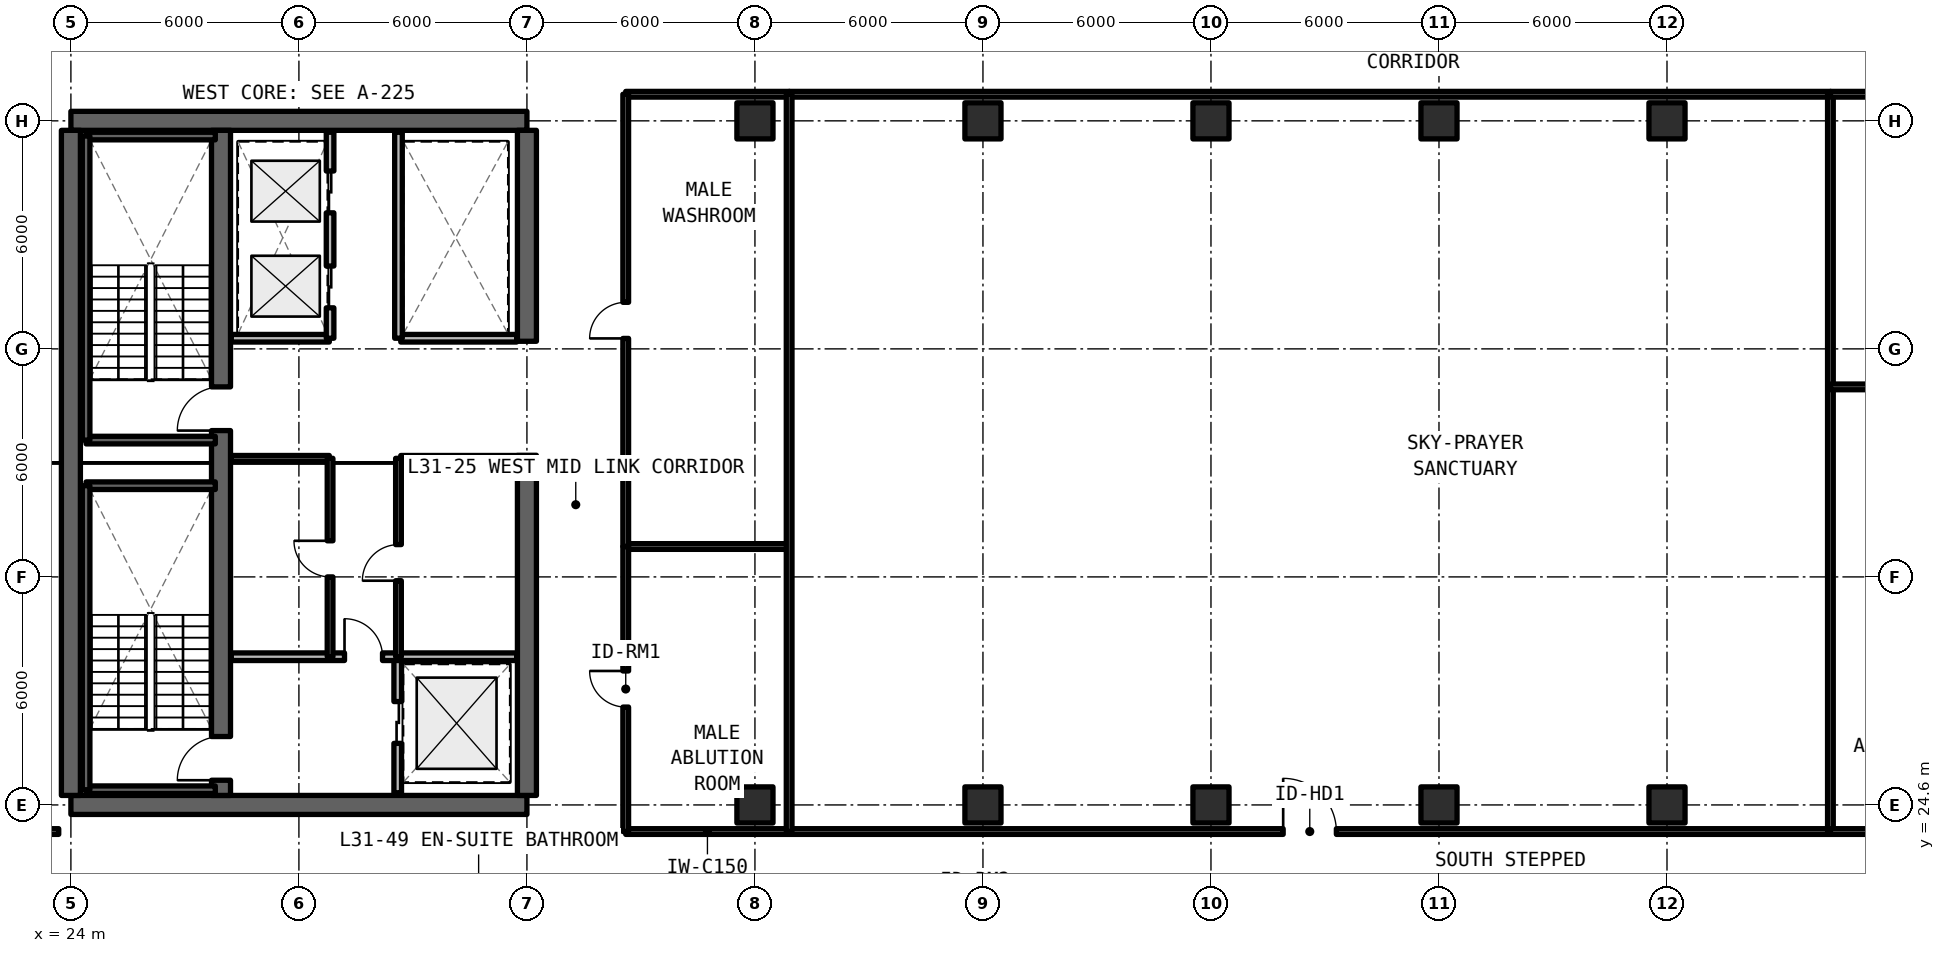
"""IFC4 building model, lengths in metres.
Left out: names, types, materials, properties, quantities, classifications, styles, units other than length and angle.
Written with IfcOpenShell. Run it as: python <this file> out.ifc"""

import sys

from ifc_helpers import new_model, si_unit, direction, frame, frame_2d, origin, origin_2d, place, context, subcontext, project, spatial, rectangle, extrude, element, fill, save


model = new_model("IFC4")
c1 = context("Model", 3, precision=1e-05, world=origin(), true_north=direction((0.0, 1.0)))
c2 = subcontext(c1, "Body", "Model", "MODEL_VIEW")
j1 = project(units=[si_unit("LENGTHUNIT", "METRE"), si_unit("PLANEANGLEUNIT", "RADIAN")], contexts=[c1])
p1 = place(None, origin())
s1 = spatial("IfcSite", under=j1, at=p1, CompositionType="ELEMENT")
p2 = place(p1, origin())
s2 = spatial("IfcBuilding", under=s1, at=p2, CompositionType="ELEMENT")
p3 = place(p2, frame((0.0, 0.0, 112.2)))
s3 = spatial("IfcBuildingStorey", under=s2, at=p3, CompositionType="ELEMENT", Elevation=112.2)
for number, where, z_axis, x_axis in (
    (1, (24.0, 24.6, 0.0), (0.0, 0.0, 1.0), (1.0, 0.0, 0.0)),
    (2, (36.0, 42.6, 0.0), (0.0, 0.0, 1.0), (-1.0, 0.0, 0.0)),
):
    element("IfcWall", number, at=place(p3, frame(where, z_axis=z_axis, x_axis=x_axis)), inside=s3, PredefinedType="SHEAR", context=c2, shape_type="SweptSolid", body=[
        extrude(rectangle(XDim=12.0, YDim=0.5, at=frame_2d((6.0, 0.0))), origin(), (0.0, 0.0, 1.0), 3.63),
    ])
p4 = place(p3, frame((24.0, 24.85, 0.0), z_axis=(0.0, 0.0, 1.0), x_axis=(0.0, 1.0, 0.0)))
e3 = element("IfcWall", 3, at=p4, inside=s3, PredefinedType="SHEAR", context=c2, shape_type="SweptSolid", body=[
    extrude(rectangle(XDim=17.5, YDim=0.5, at=frame_2d((8.75, 0.0))), origin(), (0.0, 0.0, 1.0), 3.63),
])
p5 = place(p3, frame((36.0, 24.85, 0.0), z_axis=(0.0, 0.0, 1.0), x_axis=(0.0, 1.0, 0.0)))
e4 = element("IfcWall", 4, at=p5, inside=s3, PredefinedType="SHEAR", context=c2, shape_type="SweptSolid", body=[
    extrude(rectangle(XDim=8.95, YDim=0.5, at=frame_2d((4.475, 0.0))), origin(), (0.0, 0.0, 1.0), 3.63),
])
p6 = place(p3, frame((36.0, 36.8, 0.0), z_axis=(0.0, 0.0, 1.0), x_axis=(0.0, 1.0, 0.0)))
e5 = element("IfcWall", 5, at=p6, inside=s3, PredefinedType="SHEAR", context=c2, shape_type="SweptSolid", body=[
    extrude(rectangle(XDim=5.55, YDim=0.5, at=frame_2d((2.775, 0.0))), origin(), (0.0, 0.0, 1.0), 3.63),
])
p7 = place(p3, frame((27.95, 24.85, 0.0), z_axis=(0.0, 0.0, 1.0), x_axis=(0.0, 1.0, 0.0)))
e6 = element("IfcWall", 6, at=p7, inside=s3, PredefinedType="SHEAR", context=c2, shape_type="SweptSolid", body=[
    extrude(rectangle(XDim=17.5, YDim=0.5, at=frame_2d((8.75, 0.0))), origin(), (0.0, 0.0, 1.0), 3.63),
])
p8 = place(p7, frame((0.4, 0.0, 0.0)))
e7 = element("IfcOpeningElement", 7, at=p8, cuts=e6, PredefinedType="OPENING", context=c2, shape_type="SweptSolid", body=[
    extrude(rectangle(XDim=1.15, YDim=2.15, at=frame_2d((0.575, 1.075))), frame((0.0, 0.26, 0.0), z_axis=(0.0, -1.0, 0.0), x_axis=(1.0, 0.0, 0.0)), (0.0, 0.0, 1.0), 0.52),
])
p9 = place(p7, frame((9.6, 0.0, 0.0)))
e8 = element("IfcOpeningElement", 8, at=p9, cuts=e6, PredefinedType="OPENING", context=c2, shape_type="SweptSolid", body=[
    extrude(rectangle(XDim=1.15, YDim=2.15, at=frame_2d((0.575, 1.075))), frame((0.0, 0.26, 0.0), z_axis=(0.0, -1.0, 0.0), x_axis=(1.0, 0.0, 0.0)), (0.0, 0.0, 1.0), 0.52),
])
for number, where, z_axis, x_axis in (
    (9, (42.0, 24.6, 0.0), (0.0, 0.0, 1.0), (1.0, 0.0, 0.0)),
    (10, (42.0, 42.6, 0.0), (0.0, 0.0, 1.0), (1.0, 0.0, 0.0)),
    (11, (48.0, 24.6, 0.0), (0.0, 0.0, 1.0), (1.0, 0.0, 0.0)),
    (12, (48.0, 42.6, 0.0), (0.0, 0.0, 1.0), (1.0, 0.0, 0.0)),
    (13, (54.0, 24.6, 0.0), (0.0, 0.0, 1.0), (1.0, 0.0, 0.0)),
    (14, (54.0, 42.6, 0.0), (0.0, 0.0, 1.0), (1.0, 0.0, 0.0)),
    (15, (60.0, 24.6, 0.0), (0.0, 0.0, 1.0), (1.0, 0.0, 0.0)),
    (16, (60.0, 42.6, 0.0), (0.0, 0.0, 1.0), (1.0, 0.0, 0.0)),
    (17, (66.0, 24.6, 0.0), (0.0, 0.0, 1.0), (1.0, 0.0, 0.0)),
    (18, (66.0, 42.6, 0.0), (0.0, 0.0, 1.0), (1.0, 0.0, 0.0)),
):
    element("IfcColumn", number, at=place(p3, frame(where, z_axis=z_axis, x_axis=x_axis)), inside=s3, PredefinedType="COLUMN", context=c2, shape_type="SweptSolid", body=[
        extrude(rectangle(XDim=0.95, YDim=0.95, at=origin_2d()), origin(), (0.0, 0.0, 1.0), 3.63),
    ])
p10 = place(p3, frame((32.6, 24.92, 0.0), z_axis=(0.0, 0.0, 1.0), x_axis=(0.0, 1.0, 0.0)))
e19 = element("IfcWall", 19, at=p10, inside=s3, PredefinedType="SOLIDWALL", context=c2, shape_type="SweptSolid", body=[
    extrude(rectangle(XDim=3.58, YDim=0.2, at=frame_2d((1.79, 0.0))), origin(), (0.0, 0.0, 1.0), 2.63),
])
p11 = place(p10, frame((1.3, 0.0, 0.0)))
e20 = element("IfcOpeningElement", 20, at=p11, cuts=e19, PredefinedType="OPENING", context=c2, shape_type="SweptSolid", body=[
    extrude(rectangle(XDim=1.1, YDim=2.2, at=frame_2d((0.55, 1.1))), frame((0.0, 0.11, 0.0), z_axis=(0.0, -1.0, 0.0), x_axis=(1.0, 0.0, 0.0)), (0.0, 0.0, 1.0), 0.22),
])
p12 = place(p3, frame((28.22, 28.5, 0.0), z_axis=(0.0, 0.0, 1.0), x_axis=(1.0, 0.0, 0.0)))
e21 = element("IfcWall", 21, at=p12, inside=s3, PredefinedType="SOLIDWALL", context=c2, shape_type="SweptSolid", body=[
    extrude(rectangle(XDim=7.51, YDim=0.2, at=frame_2d((3.755, 0.0))), origin(), (0.0, 0.0, 1.0), 2.63),
])
p13 = place(p12, frame((2.98, 0.0, 0.0)))
e22 = element("IfcOpeningElement", 22, at=p13, cuts=e21, PredefinedType="OPENING", context=c2, shape_type="SweptSolid", body=[
    extrude(rectangle(XDim=1.0, YDim=2.15, at=frame_2d((0.5, 1.075))), frame((0.0, 0.11, 0.0), z_axis=(0.0, -1.0, 0.0), x_axis=(1.0, 0.0, 0.0)), (0.0, 0.0, 1.0), 0.22),
])
p14 = place(p3, frame((28.22, 33.72, 0.0), z_axis=(0.0, 0.0, 1.0), x_axis=(1.0, 0.0, 0.0)))
e23 = element("IfcWall", 23, at=p14, inside=s3, PredefinedType="SOLIDWALL", context=c2, shape_type="SweptSolid", body=[
    extrude(rectangle(XDim=2.58, YDim=0.15, at=frame_2d((1.29, 0.0))), origin(), (0.0, 0.0, 1.0), 2.63),
])
p15 = place(p3, frame((30.82, 28.5, 0.0), z_axis=(0.0, 0.0, 1.0), x_axis=(0.0, 1.0, 0.0)))
e24 = element("IfcWall", 24, at=p15, inside=s3, PredefinedType="SOLIDWALL", context=c2, shape_type="SweptSolid", body=[
    extrude(rectangle(XDim=5.22, YDim=0.15, at=frame_2d((2.61, 0.0))), origin(), (0.0, 0.0, 1.0), 2.63),
])
p16 = place(p15, frame((2.1, 0.0, 0.0)))
e25 = element("IfcOpeningElement", 25, at=p16, cuts=e24, PredefinedType="OPENING", context=c2, shape_type="SweptSolid", body=[
    extrude(rectangle(XDim=0.95, YDim=2.15, at=frame_2d((0.475, 1.075))), frame((0.0, 0.085, 0.0), z_axis=(0.0, -1.0, 0.0), x_axis=(1.0, 0.0, 0.0)), (0.0, 0.0, 1.0), 0.17),
])
p17 = place(p3, frame((32.68, 33.72, 0.0), z_axis=(0.0, 0.0, 1.0), x_axis=(1.0, 0.0, 0.0)))
e26 = element("IfcWall", 26, at=p17, inside=s3, PredefinedType="SOLIDWALL", context=c2, shape_type="SweptSolid", body=[
    extrude(rectangle(XDim=3.05, YDim=0.15, at=frame_2d((1.525, 0.0))), origin(), (0.0, 0.0, 1.0), 2.63),
])
p18 = place(p3, frame((32.62, 28.5, 0.0), z_axis=(0.0, 0.0, 1.0), x_axis=(0.0, 1.0, 0.0)))
e27 = element("IfcWall", 27, at=p18, inside=s3, PredefinedType="SOLIDWALL", context=c2, shape_type="SweptSolid", body=[
    extrude(rectangle(XDim=5.22, YDim=0.15, at=frame_2d((2.61, 0.0))), origin(), (0.0, 0.0, 1.0), 2.63),
])
p19 = place(p18, frame((2.0, 0.0, 0.0)))
e28 = element("IfcOpeningElement", 28, at=p19, cuts=e27, PredefinedType="OPENING", context=c2, shape_type="SweptSolid", body=[
    extrude(rectangle(XDim=0.95, YDim=2.15, at=frame_2d((0.475, 1.075))), frame((0.0, 0.085, 0.0), z_axis=(0.0, -1.0, 0.0), x_axis=(1.0, 0.0, 0.0)), (0.0, 0.0, 1.0), 0.17),
])
p20 = place(p3, frame((28.22, 36.88, 0.0), z_axis=(0.0, 0.0, 1.0), x_axis=(1.0, 0.0, 0.0)))
e29 = element("IfcWall", 29, at=p20, inside=s3, PredefinedType="SOLIDWALL", context=c2, shape_type="SweptSolid", body=[
    extrude(rectangle(XDim=2.58, YDim=0.2, at=frame_2d((1.29, 0.0))), origin(), (0.0, 0.0, 1.0), 2.63),
])
p21 = place(p3, frame((30.82, 36.88, 0.0), z_axis=(0.0, 0.0, 1.0), x_axis=(0.0, 1.0, 0.0)))
e30 = element("IfcWall", 30, at=p21, inside=s3, PredefinedType="SOLIDWALL", context=c2, shape_type="SweptSolid", body=[
    extrude(rectangle(XDim=5.42, YDim=0.2, at=frame_2d((2.71, 0.0))), origin(), (0.0, 0.0, 1.0), 2.63),
])
p22 = place(p21, frame((0.8, 0.0, 0.0)))
e31 = element("IfcOpeningElement", 31, at=p22, cuts=e30, PredefinedType="OPENING", context=c2, shape_type="SweptSolid", body=[
    extrude(rectangle(XDim=1.1, YDim=2.2, at=frame_2d((0.55, 1.1))), frame((0.0, 0.11, 0.0), z_axis=(0.0, -1.0, 0.0), x_axis=(1.0, 0.0, 0.0)), (0.0, 0.0, 1.0), 0.22),
])
p23 = place(p21, frame((3.3, 0.0, 0.0)))
e32 = element("IfcOpeningElement", 32, at=p23, cuts=e30, PredefinedType="OPENING", context=c2, shape_type="SweptSolid", body=[
    extrude(rectangle(XDim=1.1, YDim=2.2, at=frame_2d((0.55, 1.1))), frame((0.0, 0.11, 0.0), z_axis=(0.0, -1.0, 0.0), x_axis=(1.0, 0.0, 0.0)), (0.0, 0.0, 1.0), 0.22),
])
p24 = place(p3, frame((32.68, 36.88, 0.0), z_axis=(0.0, 0.0, 1.0), x_axis=(1.0, 0.0, 0.0)))
e33 = element("IfcWall", 33, at=p24, inside=s3, PredefinedType="SOLIDWALL", context=c2, shape_type="SweptSolid", body=[
    extrude(rectangle(XDim=3.05, YDim=0.2, at=frame_2d((1.525, 0.0))), origin(), (0.0, 0.0, 1.0), 2.63),
])
p25 = place(p3, frame((32.62, 36.88, 0.0), z_axis=(0.0, 0.0, 1.0), x_axis=(0.0, 1.0, 0.0)))
e34 = element("IfcWall", 34, at=p25, inside=s3, PredefinedType="SOLIDWALL", context=c2, shape_type="SweptSolid", body=[
    extrude(rectangle(XDim=5.42, YDim=0.2, at=frame_2d((2.71, 0.0))), origin(), (0.0, 0.0, 1.0), 2.63),
])
for number, where, z_axis, x_axis in (
    (35, (38.6, 23.9, 0.0), (0.0, 0.0, 1.0), (1.0, 0.0, 0.0)),
    (36, (38.6, 31.4, 0.0), (0.0, 0.0, 1.0), (1.0, 0.0, 0.0)),
):
    element("IfcWall", number, at=place(p3, frame(where, z_axis=z_axis, x_axis=x_axis)), inside=s3, PredefinedType="SOLIDWALL", context=c2, shape_type="SweptSolid", body=[
        extrude(rectangle(XDim=4.3, YDim=0.15, at=frame_2d((2.15, 0.0))), origin(), (0.0, 0.0, 1.0), 2.63),
    ])
p26 = place(p3, frame((38.6, 23.9, 0.0), z_axis=(0.0, 0.0, 1.0), x_axis=(0.0, 1.0, 0.0)))
e37 = element("IfcWall", 37, at=p26, inside=s3, PredefinedType="SOLIDWALL", context=c2, shape_type="SweptSolid", body=[
    extrude(rectangle(XDim=7.5, YDim=0.15, at=frame_2d((3.75, 0.0))), origin(), (0.0, 0.0, 1.0), 2.63),
])
p27 = place(p26, frame((3.275, 0.0, 0.0)))
e38 = element("IfcOpeningElement", 38, at=p27, cuts=e37, PredefinedType="OPENING", context=c2, shape_type="SweptSolid", body=[
    extrude(rectangle(XDim=0.95, YDim=2.15, at=frame_2d((0.475, 1.075))), frame((0.0, 0.085, 0.0), z_axis=(0.0, -1.0, 0.0), x_axis=(1.0, 0.0, 0.0)), (0.0, 0.0, 1.0), 0.17),
])
p28 = place(p3, frame((38.6, 43.3, 0.0), z_axis=(0.0, 0.0, 1.0), x_axis=(1.0, 0.0, 0.0)))
e39 = element("IfcWall", 39, at=p28, inside=s3, PredefinedType="SOLIDWALL", context=c2, shape_type="SweptSolid", body=[
    extrude(rectangle(XDim=4.3, YDim=0.15, at=frame_2d((2.15, 0.0))), origin(), (0.0, 0.0, 1.0), 2.63),
])
p29 = place(p3, frame((38.6, 31.4, 0.0), z_axis=(0.0, 0.0, 1.0), x_axis=(0.0, 1.0, 0.0)))
e40 = element("IfcWall", 40, at=p29, inside=s3, PredefinedType="SOLIDWALL", context=c2, shape_type="SweptSolid", body=[
    extrude(rectangle(XDim=11.9, YDim=0.15, at=frame_2d((5.95, 0.0))), origin(), (0.0, 0.0, 1.0), 2.63),
])
p30 = place(p29, frame((5.475, 0.0, 0.0)))
e41 = element("IfcOpeningElement", 41, at=p30, cuts=e40, PredefinedType="OPENING", context=c2, shape_type="SweptSolid", body=[
    extrude(rectangle(XDim=0.95, YDim=2.15, at=frame_2d((0.475, 1.075))), frame((0.0, 0.085, 0.0), z_axis=(0.0, -1.0, 0.0), x_axis=(1.0, 0.0, 0.0)), (0.0, 0.0, 1.0), 0.17),
])
p31 = place(p3, frame((42.9, 23.9, 0.0), z_axis=(0.0, 0.0, 1.0), x_axis=(1.0, 0.0, 0.0)))
e42 = element("IfcWall", 42, at=p31, inside=s3, PredefinedType="SOLIDWALL", context=c2, shape_type="SweptSolid", body=[
    extrude(rectangle(XDim=27.4, YDim=0.15, at=frame_2d((13.7, 0.0))), origin(), (0.0, 0.0, 1.0), 2.63),
])
p32 = place(p31, frame((13.0, 0.0, 0.0)))
e43 = element("IfcOpeningElement", 43, at=p32, cuts=e42, PredefinedType="OPENING", context=c2, shape_type="SweptSolid", body=[
    extrude(rectangle(XDim=1.4, YDim=2.15, at=frame_2d((0.7, 1.075))), frame((0.0, 0.085, 0.0), z_axis=(0.0, -1.0, 0.0), x_axis=(1.0, 0.0, 0.0)), (0.0, 0.0, 1.0), 0.17),
])
p33 = place(p3, frame((42.9, 43.3, 0.0), z_axis=(0.0, 0.0, 1.0), x_axis=(1.0, 0.0, 0.0)))
e44 = element("IfcWall", 44, at=p33, inside=s3, PredefinedType="SOLIDWALL", context=c2, shape_type="SweptSolid", body=[
    extrude(rectangle(XDim=27.4, YDim=0.15, at=frame_2d((13.7, 0.0))), origin(), (0.0, 0.0, 1.0), 2.63),
])
for number, where, z_axis, x_axis in (
    (45, (42.9, 23.9, 0.0), (0.0, 0.0, 1.0), (0.0, 1.0, 0.0)),
    (46, (70.3, 23.9, 0.0), (0.0, 0.0, 1.0), (0.0, 1.0, 0.0)),
):
    element("IfcWall", number, at=place(p3, frame(where, z_axis=z_axis, x_axis=x_axis)), inside=s3, PredefinedType="SOLIDWALL", context=c2, shape_type="SweptSolid", body=[
        extrude(rectangle(XDim=19.4, YDim=0.15, at=frame_2d((9.7, 0.0))), origin(), (0.0, 0.0, 1.0), 2.63),
    ])
for number, where, z_axis, x_axis in (
    (47, (70.3, 23.9, 0.0), (0.0, 0.0, 1.0), (1.0, 0.0, 0.0)),
    (48, (70.3, 35.6, 0.0), (0.0, 0.0, 1.0), (1.0, 0.0, 0.0)),
    (49, (70.3, 43.3, 0.0), (0.0, 0.0, 1.0), (1.0, 0.0, 0.0)),
):
    element("IfcWall", number, at=place(p3, frame(where, z_axis=z_axis, x_axis=x_axis)), inside=s3, PredefinedType="SOLIDWALL", context=c2, shape_type="SweptSolid", body=[
        extrude(rectangle(XDim=5.1, YDim=0.15, at=frame_2d((2.55, 0.0))), origin(), (0.0, 0.0, 1.0), 2.63),
    ])
p34 = place(p3, frame((17.41, 23.9, 0.0), z_axis=(0.0, 0.0, 1.0), x_axis=(1.0, 0.0, 0.0)))
e50 = element("IfcWall", 50, at=p34, inside=s3, PredefinedType="SOLIDWALL", context=c2, shape_type="SweptSolid", body=[
    extrude(rectangle(XDim=6.27, YDim=0.15, at=frame_2d((3.135, 0.0))), origin(), (0.0, 0.0, 1.0), 2.63),
])
p35 = place(p34, frame((2.66, 0.0, 0.0)))
e51 = element("IfcOpeningElement", 51, at=p35, cuts=e50, PredefinedType="OPENING", context=c2, shape_type="SweptSolid", body=[
    extrude(rectangle(XDim=0.95, YDim=2.15, at=frame_2d((0.475, 1.075))), frame((0.0, 0.085, 0.0), z_axis=(0.0, -1.0, 0.0), x_axis=(1.0, 0.0, 0.0)), (0.0, 0.0, 1.0), 0.17),
])
for number, where, z_axis, x_axis in (
    (52, (24.4, 25.0, 0.0), (0.0, 0.0, 1.0), (1.0, 0.0, 0.0)),
    (53, (27.8, 33.0, 0.0), (0.0, 0.0, 1.0), (-1.0, 0.0, 0.0)),
):
    element("IfcWall", number, at=place(p3, frame(where, z_axis=z_axis, x_axis=x_axis)), inside=s3, PredefinedType="SOLIDWALL", context=c2, shape_type="SweptSolid", body=[
        extrude(rectangle(XDim=3.4, YDim=0.2, at=frame_2d((1.7, 0.0))), origin(), (0.0, 0.0, 1.0), 3.63),
    ])
p36 = place(p3, frame((24.4, 33.0, 0.0), z_axis=(0.0, 0.0, 1.0), x_axis=(0.0, -1.0, 0.0)))
e54 = element("IfcWall", 54, at=p36, inside=s3, PredefinedType="SOLIDWALL", context=c2, shape_type="SweptSolid", body=[
    extrude(rectangle(XDim=8.0, YDim=0.2, at=frame_2d((4.0, 0.0))), origin(), (0.0, 0.0, 1.0), 3.63),
])
for number, where, z_axis, x_axis in (
    (55, (24.4, 34.2, 0.0), (0.0, 0.0, 1.0), (1.0, 0.0, 0.0)),
    (56, (27.8, 42.2, 0.0), (0.0, 0.0, 1.0), (-1.0, 0.0, 0.0)),
):
    element("IfcWall", number, at=place(p3, frame(where, z_axis=z_axis, x_axis=x_axis)), inside=s3, PredefinedType="SOLIDWALL", context=c2, shape_type="SweptSolid", body=[
        extrude(rectangle(XDim=3.4, YDim=0.2, at=frame_2d((1.7, 0.0))), origin(), (0.0, 0.0, 1.0), 3.63),
    ])
p37 = place(p3, frame((24.4, 42.2, 0.0), z_axis=(0.0, 0.0, 1.0), x_axis=(0.0, -1.0, 0.0)))
e57 = element("IfcWall", 57, at=p37, inside=s3, PredefinedType="SOLIDWALL", context=c2, shape_type="SweptSolid", body=[
    extrude(rectangle(XDim=8.0, YDim=0.2, at=frame_2d((4.0, 0.0))), origin(), (0.0, 0.0, 1.0), 3.63),
])
p38 = place(p11, origin())
e58 = element("IfcDoor", 58, at=p38, inside=s3, OperationType="SLIDING_TO_LEFT", PredefinedType="DOOR", context=c2, shape_type="SweptSolid", body=[
    extrude(rectangle(XDim=1.1, YDim=2.2, at=frame_2d((0.55, 1.1))), frame((0.0, 0.025, 0.0), z_axis=(0.0, -1.0, 0.0), x_axis=(1.0, 0.0, 0.0)), (0.0, 0.0, 1.0), 0.05),
])
fill(e20, e58)
p39 = place(p13, origin())
e59 = element("IfcDoor", 59, at=p39, inside=s3, OperationType="SINGLE_SWING_LEFT", PredefinedType="DOOR", context=c2, shape_type="SweptSolid", body=[
    extrude(rectangle(XDim=1.0, YDim=2.15, at=frame_2d((0.5, 1.075))), frame((0.0, 0.025, 0.0), z_axis=(0.0, -1.0, 0.0), x_axis=(1.0, 0.0, 0.0)), (0.0, 0.0, 1.0), 0.05),
])
fill(e22, e59)
p40 = place(p16, origin())
e60 = element("IfcDoor", 60, at=p40, inside=s3, OperationType="SINGLE_SWING_RIGHT", PredefinedType="DOOR", context=c2, shape_type="SweptSolid", body=[
    extrude(rectangle(XDim=0.95, YDim=2.15, at=frame_2d((0.475, 1.075))), frame((0.0, 0.025, 0.0), z_axis=(0.0, -1.0, 0.0), x_axis=(1.0, 0.0, 0.0)), (0.0, 0.0, 1.0), 0.05),
])
fill(e25, e60)
p41 = place(p19, origin())
e61 = element("IfcDoor", 61, at=p41, inside=s3, OperationType="SINGLE_SWING_LEFT", PredefinedType="DOOR", context=c2, shape_type="SweptSolid", body=[
    extrude(rectangle(XDim=0.95, YDim=2.15, at=frame_2d((0.475, 1.075))), frame((0.0, 0.025, 0.0), z_axis=(0.0, -1.0, 0.0), x_axis=(1.0, 0.0, 0.0)), (0.0, 0.0, 1.0), 0.05),
])
fill(e28, e61)
p42 = place(p22, origin())
e62 = element("IfcDoor", 62, at=p42, inside=s3, OperationType="SLIDING_TO_LEFT", PredefinedType="DOOR", context=c2, shape_type="SweptSolid", body=[
    extrude(rectangle(XDim=1.1, YDim=2.2, at=frame_2d((0.55, 1.1))), frame((0.0, 0.025, 0.0), z_axis=(0.0, -1.0, 0.0), x_axis=(1.0, 0.0, 0.0)), (0.0, 0.0, 1.0), 0.05),
])
fill(e31, e62)
p43 = place(p23, origin())
e63 = element("IfcDoor", 63, at=p43, inside=s3, OperationType="SLIDING_TO_RIGHT", PredefinedType="DOOR", context=c2, shape_type="SweptSolid", body=[
    extrude(rectangle(XDim=1.1, YDim=2.2, at=frame_2d((0.55, 1.1))), frame((0.0, 0.025, 0.0), z_axis=(0.0, -1.0, 0.0), x_axis=(1.0, 0.0, 0.0)), (0.0, 0.0, 1.0), 0.05),
])
fill(e32, e63)
p44 = place(p27, origin())
e64 = element("IfcDoor", 64, at=p44, inside=s3, OperationType="SINGLE_SWING_RIGHT", PredefinedType="DOOR", context=c2, shape_type="SweptSolid", body=[
    extrude(rectangle(XDim=0.95, YDim=2.15, at=frame_2d((0.475, 1.075))), frame((0.0, 0.025, 0.0), z_axis=(0.0, -1.0, 0.0), x_axis=(1.0, 0.0, 0.0)), (0.0, 0.0, 1.0), 0.05),
])
fill(e38, e64)
p45 = place(p30, origin())
e65 = element("IfcDoor", 65, at=p45, inside=s3, OperationType="SINGLE_SWING_LEFT", PredefinedType="DOOR", context=c2, shape_type="SweptSolid", body=[
    extrude(rectangle(XDim=0.95, YDim=2.15, at=frame_2d((0.475, 1.075))), frame((0.0, 0.025, 0.0), z_axis=(0.0, -1.0, 0.0), x_axis=(1.0, 0.0, 0.0)), (0.0, 0.0, 1.0), 0.05),
])
fill(e41, e65)
p46 = place(p32, origin())
e66 = element("IfcDoor", 66, at=p46, inside=s3, OperationType="SINGLE_SWING_RIGHT", PredefinedType="DOOR", context=c2, shape_type="SweptSolid", body=[
    extrude(rectangle(XDim=1.4, YDim=2.15, at=frame_2d((0.7, 1.075))), frame((0.0, 0.025, 0.0), z_axis=(0.0, -1.0, 0.0), x_axis=(1.0, 0.0, 0.0)), (0.0, 0.0, 1.0), 0.05),
])
fill(e43, e66)
p47 = place(p8, origin())
e67 = element("IfcDoor", 67, at=p47, inside=s3, OperationType="SINGLE_SWING_RIGHT", PredefinedType="DOOR", context=c2, shape_type="SweptSolid", body=[
    extrude(rectangle(XDim=1.15, YDim=2.15, at=frame_2d((0.575, 1.075))), frame((0.0, 0.025, 0.0), z_axis=(0.0, -1.0, 0.0), x_axis=(1.0, 0.0, 0.0)), (0.0, 0.0, 1.0), 0.05),
])
fill(e7, e67)
p48 = place(p9, origin())
e68 = element("IfcDoor", 68, at=p48, inside=s3, OperationType="SINGLE_SWING_LEFT", PredefinedType="DOOR", context=c2, shape_type="SweptSolid", body=[
    extrude(rectangle(XDim=1.15, YDim=2.15, at=frame_2d((0.575, 1.075))), frame((0.0, 0.025, 0.0), z_axis=(0.0, -1.0, 0.0), x_axis=(1.0, 0.0, 0.0)), (0.0, 0.0, 1.0), 0.05),
])
fill(e8, e68)
save(model, sys.argv[1])
